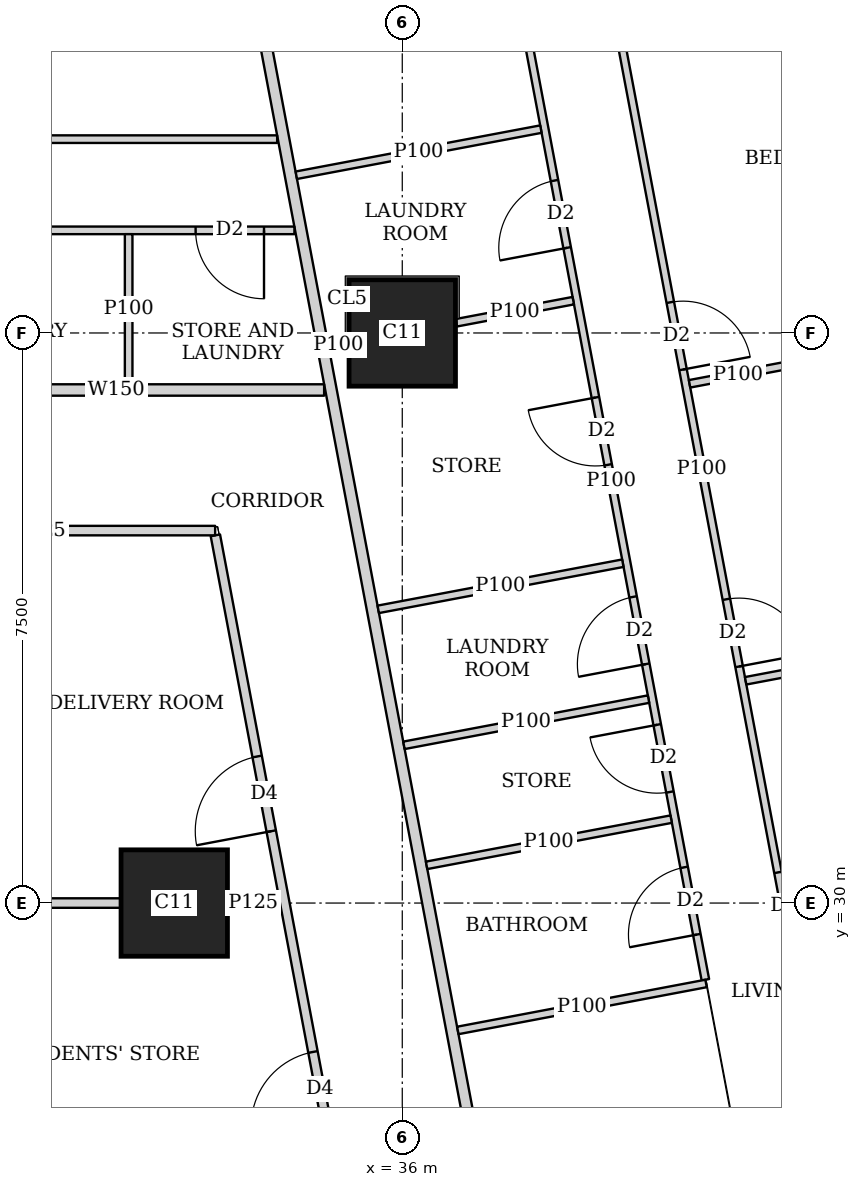
"""IFC4 building model, lengths in metres.
Left out: names, types, materials, properties, quantities, classifications, styles, units other than length and angle.
Written with IfcOpenShell. Run it as: python <this file> out.ifc"""

import sys

from ifc_helpers import new_model, si_unit, direction, frame, frame_2d, origin, origin_2d, place, context, subcontext, project, spatial, rectangle, extrude, element, fill, save


model = new_model("IFC4")
c1 = context("Model", 3, precision=1e-05, world=origin(), true_north=direction((0.0, 1.0)))
c2 = subcontext(c1, "Body", "Model", "MODEL_VIEW")
j1 = project(units=[si_unit("LENGTHUNIT", "METRE"), si_unit("PLANEANGLEUNIT", "RADIAN")], contexts=[c1])
p1 = place(None, origin())
s1 = spatial("IfcSite", under=j1, at=p1, CompositionType="ELEMENT")
p2 = place(p1, origin())
s2 = spatial("IfcBuilding", under=s1, at=p2, CompositionType="ELEMENT")
p3 = place(p2, frame((0.0, 0.0, 266.6)))
s3 = spatial("IfcBuildingStorey", under=s2, at=p3, CompositionType="ELEMENT", Elevation=266.6)
for number, where, z_axis, x_axis in (
    (1, (33.0, 30.0, 0.0), (0.0, 0.0, 1.0), (1.0, 0.0, 0.0)),
    (2, (36.0, 37.5, 0.0), (0.0, 0.0, 1.0), (1.0, 0.0, 0.0)),
):
    element("IfcColumn", number, at=place(p3, frame(where, z_axis=z_axis, x_axis=x_axis)), inside=s3, PredefinedType="COLUMN", context=c2, shape_type="SweptSolid", body=[
        extrude(rectangle(XDim=1.4, YDim=1.4, at=origin_2d()), origin(), (0.0, 0.0, 1.0), 3.75),
    ])
p4 = place(p3, frame((29.501, 36.75, 0.0), z_axis=(0.0, 0.0, 1.0), x_axis=(1.0, 0.0, 0.0)))
e3 = element("IfcWall", 3, at=p4, inside=s3, PredefinedType="SOLIDWALL", context=c2, shape_type="SweptSolid", body=[
    extrude(rectangle(XDim=5.471, YDim=0.15, at=frame_2d((2.735, 0.0))), origin(), (0.0, 0.0, 1.0), 3.5),
])
p5 = place(p3, frame((34.036, 42.186, 0.0), z_axis=(0.0, 0.0, 1.0), x_axis=(0.185593518645, -0.9826266055, 0.0)))
e4 = element("IfcWall", 4, at=p5, inside=s3, PredefinedType="SOLIDWALL", context=c2, shape_type="SweptSolid", body=[
    extrude(rectangle(XDim=35.961, YDim=0.15, at=frame_2d((17.98, 0.0))), origin(), (0.0, 0.0, 1.0), 2.5),
])
p6 = place(p5, frame((15.529, 0.0, 0.0)))
e5 = element("IfcOpeningElement", 5, at=p6, cuts=e4, PredefinedType="OPENING", context=c2, shape_type="SweptSolid", body=[
    extrude(rectangle(XDim=1.0, YDim=2.1, at=frame_2d((0.5, 1.05))), frame((0.0, 0.085, 0.0), z_axis=(0.0, -1.0, 0.0), x_axis=(1.0, 0.0, 0.0)), (0.0, 0.0, 1.0), 0.17),
])
p7 = place(p5, frame((19.345, 0.0, 0.0)))
e6 = element("IfcOpeningElement", 6, at=p7, cuts=e4, PredefinedType="OPENING", context=c2, shape_type="SweptSolid", body=[
    extrude(rectangle(XDim=1.0, YDim=2.1, at=frame_2d((0.5, 1.05))), frame((0.0, 0.085, 0.0), z_axis=(0.0, -1.0, 0.0), x_axis=(1.0, 0.0, 0.0)), (0.0, 0.0, 1.0), 0.17),
])
p8 = place(p5, frame((30.594, 0.0, 0.0)))
e7 = element("IfcOpeningElement", 7, at=p8, cuts=e4, PredefinedType="OPENING", context=c2, shape_type="SweptSolid", body=[
    extrude(rectangle(XDim=1.0, YDim=2.1, at=frame_2d((0.5, 1.05))), frame((0.0, 0.085, 0.0), z_axis=(0.0, -1.0, 0.0), x_axis=(1.0, 0.0, 0.0)), (0.0, 0.0, 1.0), 0.17),
])
p9 = place(p3, frame((38.744, 42.045, 0.0), z_axis=(0.0, 0.0, 1.0), x_axis=(0.185614085367, -0.982622720739, 0.0)))
e8 = element("IfcWall", 8, at=p9, inside=s3, PredefinedType="PARTITIONING", context=c2, shape_type="SweptSolid", body=[
    extrude(rectangle(XDim=12.898, YDim=0.1, at=frame_2d((6.449, 0.0))), origin(), (0.0, 0.0, 1.0), 2.5),
])
p10 = place(p9, frame((11.848, 0.0, 0.0)))
e9 = element("IfcOpeningElement", 9, at=p10, cuts=e8, PredefinedType="OPENING", context=c2, shape_type="SweptSolid", body=[
    extrude(rectangle(XDim=0.9, YDim=2.1, at=frame_2d((0.45, 1.05))), frame((0.0, 0.06, 0.0), z_axis=(0.0, -1.0, 0.0), x_axis=(1.0, 0.0, 0.0)), (0.0, 0.0, 1.0), 0.12),
])
p11 = place(p9, frame((8.191, 0.0, 0.0)))
e10 = element("IfcOpeningElement", 10, at=p11, cuts=e8, PredefinedType="OPENING", context=c2, shape_type="SweptSolid", body=[
    extrude(rectangle(XDim=0.9, YDim=2.1, at=frame_2d((0.45, 1.05))), frame((0.0, 0.06, 0.0), z_axis=(0.0, -1.0, 0.0), x_axis=(1.0, 0.0, 0.0)), (0.0, 0.0, 1.0), 0.12),
])
p12 = place(p9, frame((4.215, 0.0, 0.0)))
e11 = element("IfcOpeningElement", 11, at=p12, cuts=e8, PredefinedType="OPENING", context=c2, shape_type="SweptSolid", body=[
    extrude(rectangle(XDim=0.9, YDim=2.1, at=frame_2d((0.45, 1.05))), frame((0.0, 0.06, 0.0), z_axis=(0.0, -1.0, 0.0), x_axis=(1.0, 0.0, 0.0)), (0.0, 0.0, 1.0), 0.12),
])
p13 = place(p3, frame((37.511, 42.109, 0.0), z_axis=(0.0, 0.0, 1.0), x_axis=(0.185550464988, -0.982634736279, 0.0)))
e12 = element("IfcWall", 12, at=p13, inside=s3, PredefinedType="PARTITIONING", context=c2, shape_type="SweptSolid", body=[
    extrude(rectangle(XDim=13.35, YDim=0.1, at=frame_2d((6.675, 0.0))), origin(), (0.0, 0.0, 1.0), 2.5),
])
p14 = place(p13, frame((11.845, 0.0, 0.0)))
e13 = element("IfcOpeningElement", 13, at=p14, cuts=e12, PredefinedType="OPENING", context=c2, shape_type="SweptSolid", body=[
    extrude(rectangle(XDim=0.9, YDim=2.1, at=frame_2d((0.45, 1.05))), frame((0.0, 0.06, 0.0), z_axis=(0.0, -1.0, 0.0), x_axis=(1.0, 0.0, 0.0)), (0.0, 0.0, 1.0), 0.12),
])
p15 = place(p13, frame((8.224, 0.0, 0.0)))
e14 = element("IfcOpeningElement", 14, at=p15, cuts=e12, PredefinedType="OPENING", context=c2, shape_type="SweptSolid", body=[
    extrude(rectangle(XDim=0.9, YDim=2.1, at=frame_2d((0.45, 1.05))), frame((0.0, 0.06, 0.0), z_axis=(0.0, -1.0, 0.0), x_axis=(1.0, 0.0, 0.0)), (0.0, 0.0, 1.0), 0.12),
])
p16 = place(p13, frame((2.65, 0.0, 0.0)))
e15 = element("IfcOpeningElement", 15, at=p16, cuts=e12, PredefinedType="OPENING", context=c2, shape_type="SweptSolid", body=[
    extrude(rectangle(XDim=0.9, YDim=2.1, at=frame_2d((0.45, 1.05))), frame((0.0, 0.06, 0.0), z_axis=(0.0, -1.0, 0.0), x_axis=(1.0, 0.0, 0.0)), (0.0, 0.0, 1.0), 0.12),
])
p17 = place(p13, frame((9.936, 0.0, 0.0)))
e16 = element("IfcOpeningElement", 16, at=p17, cuts=e12, PredefinedType="OPENING", context=c2, shape_type="SweptSolid", body=[
    extrude(rectangle(XDim=0.9, YDim=2.1, at=frame_2d((0.45, 1.05))), frame((0.0, 0.06, 0.0), z_axis=(0.0, -1.0, 0.0), x_axis=(1.0, 0.0, 0.0)), (0.0, 0.0, 1.0), 0.12),
])
p18 = place(p13, frame((5.555, 0.0, 0.0)))
e17 = element("IfcOpeningElement", 17, at=p18, cuts=e12, PredefinedType="OPENING", context=c2, shape_type="SweptSolid", body=[
    extrude(rectangle(XDim=0.9, YDim=2.1, at=frame_2d((0.45, 1.05))), frame((0.0, 0.06, 0.0), z_axis=(0.0, -1.0, 0.0), x_axis=(1.0, 0.0, 0.0)), (0.0, 0.0, 1.0), 0.12),
])
p19 = place(p3, frame((41.054, 37.072, 0.0), z_axis=(0.0, 0.0, 1.0), x_axis=(-0.982576752117, -0.185857273733, 0.0)))
e18 = element("IfcWall", 18, at=p19, inside=s3, PredefinedType="PARTITIONING", context=c2, shape_type="SweptSolid", body=[
    extrude(rectangle(XDim=1.297, YDim=0.1, at=frame_2d((0.648, 0.0))), origin(), (0.0, 0.0, 1.0), 3.5),
])
p20 = place(p3, frame((44.693, 33.713, 0.0), z_axis=(0.0, 0.0, 1.0), x_axis=(-0.982615600536, -0.185651775062, 0.0)))
e19 = element("IfcWall", 19, at=p20, inside=s3, PredefinedType="PARTITIONING", context=c2, shape_type="SweptSolid", body=[
    extrude(rectangle(XDim=4.249, YDim=0.1, at=frame_2d((2.125, 0.0))), origin(), (0.0, 0.0, 1.0), 2.5),
])
p21 = place(p3, frame((37.824, 40.182, 0.0), z_axis=(0.0, 0.0, 1.0), x_axis=(-0.982674977865, -0.185337227447, 0.0)))
e20 = element("IfcWall", 20, at=p21, inside=s3, PredefinedType="PARTITIONING", context=c2, shape_type="SweptSolid", body=[
    extrude(rectangle(XDim=3.275, YDim=0.1, at=frame_2d((1.637, 0.0))), origin(), (0.0, 0.0, 1.0), 3.5),
])
p22 = place(p3, frame((38.25, 37.925, 0.0), z_axis=(0.0, 0.0, 1.0), x_axis=(-0.982610209589, -0.185680305934, 0.0)))
e21 = element("IfcWall", 21, at=p22, inside=s3, PredefinedType="PARTITIONING", context=c2, shape_type="SweptSolid", body=[
    extrude(rectangle(XDim=1.567, YDim=0.1, at=frame_2d((0.784, 0.0))), origin(), (0.0, 0.0, 1.0), 3.5),
])
p23 = place(p3, frame((35.29, 37.366, 0.0), z_axis=(0.0, 0.0, 1.0), x_axis=(-0.982395465615, -0.18681313963, 0.0)))
e22 = element("IfcWall", 22, at=p23, inside=s3, PredefinedType="PARTITIONING", context=c2, shape_type="SweptSolid", body=[
    extrude(rectangle(XDim=0.263, YDim=0.1, at=frame_2d((0.131, 0.0))), origin(), (0.0, 0.0, 1.0), 3.5),
])
p24 = place(p3, frame((39.24, 32.683, 0.0), z_axis=(0.0, 0.0, 1.0), x_axis=(-0.982607026909, -0.185697147715, 0.0)))
e23 = element("IfcWall", 23, at=p24, inside=s3, PredefinedType="PARTITIONING", context=c2, shape_type="SweptSolid", body=[
    extrude(rectangle(XDim=3.275, YDim=0.1, at=frame_2d((1.637, 0.0))), origin(), (0.0, 0.0, 1.0), 3.5),
])
p25 = place(p3, frame((39.997, 28.942, 0.0), z_axis=(0.0, 0.0, 1.0), x_axis=(-0.982569883123, -0.185893584556, 0.0)))
e24 = element("IfcWall", 24, at=p25, inside=s3, PredefinedType="PARTITIONING", context=c2, shape_type="SweptSolid", body=[
    extrude(rectangle(XDim=3.324, YDim=0.1, at=frame_2d((1.662, 0.0))), origin(), (0.0, 0.0, 1.0), 3.5),
])
p26 = place(p3, frame((39.538, 31.104, 0.0), z_axis=(0.0, 0.0, 1.0), x_axis=(-0.982620626894, -0.185625169636, 0.0)))
e25 = element("IfcWall", 25, at=p26, inside=s3, PredefinedType="PARTITIONING", context=c2, shape_type="SweptSolid", body=[
    extrude(rectangle(XDim=3.275, YDim=0.1, at=frame_2d((1.637, 0.0))), origin(), (0.0, 0.0, 1.0), 2.5),
])
p27 = place(p3, frame((38.902, 34.471, 0.0), z_axis=(0.0, 0.0, 1.0), x_axis=(-0.982674977865, -0.185337227447, 0.0)))
e26 = element("IfcWall", 26, at=p27, inside=s3, PredefinedType="PARTITIONING", context=c2, shape_type="SweptSolid", body=[
    extrude(rectangle(XDim=3.275, YDim=0.1, at=frame_2d((1.637, 0.0))), origin(), (0.0, 0.0, 1.0), 3.5),
])
p28 = place(p3, frame((21.6, 40.05, 0.0), z_axis=(0.0, 0.0, 1.0), x_axis=(1.0, 0.0, 0.0)))
e27 = element("IfcWall", 27, at=p28, inside=s3, PredefinedType="PARTITIONING", context=c2, shape_type="SweptSolid", body=[
    extrude(rectangle(XDim=12.754, YDim=0.1, at=frame_2d((6.377, 0.0))), origin(), (0.0, 0.0, 1.0), 3.5),
])
p29 = place(p28, frame((0.2, 0.0, 0.0)))
e28 = element("IfcOpeningElement", 28, at=p29, cuts=e27, PredefinedType="OPENING", context=c2, shape_type="SweptSolid", body=[
    extrude(rectangle(XDim=0.9, YDim=2.1, at=frame_2d((0.45, 1.05))), frame((0.0, 0.06, 0.0), z_axis=(0.0, -1.0, 0.0), x_axis=(1.0, 0.0, 0.0)), (0.0, 0.0, 1.0), 0.12),
])
p30 = place(p28, frame((3.8, 0.0, 0.0)))
e29 = element("IfcOpeningElement", 29, at=p30, cuts=e27, PredefinedType="OPENING", context=c2, shape_type="SweptSolid", body=[
    extrude(rectangle(XDim=0.9, YDim=2.1, at=frame_2d((0.45, 1.05))), frame((0.0, 0.06, 0.0), z_axis=(0.0, -1.0, 0.0), x_axis=(1.0, 0.0, 0.0)), (0.0, 0.0, 1.0), 0.12),
])
p31 = place(p28, frame((7.4, 0.0, 0.0)))
e30 = element("IfcOpeningElement", 30, at=p31, cuts=e27, PredefinedType="OPENING", context=c2, shape_type="SweptSolid", body=[
    extrude(rectangle(XDim=0.9, YDim=2.1, at=frame_2d((0.45, 1.05))), frame((0.0, 0.06, 0.0), z_axis=(0.0, -1.0, 0.0), x_axis=(1.0, 0.0, 0.0)), (0.0, 0.0, 1.0), 0.12),
])
p32 = place(p3, frame((21.6, 38.85, 0.0), z_axis=(0.0, 0.0, 1.0), x_axis=(1.0, 0.0, 0.0)))
e31 = element("IfcWall", 31, at=p32, inside=s3, PredefinedType="PARTITIONING", context=c2, shape_type="SweptSolid", body=[
    extrude(rectangle(XDim=12.981, YDim=0.1, at=frame_2d((6.49, 0.0))), origin(), (0.0, 0.0, 1.0), 3.5),
])
p33 = place(p32, frame((1.35, 0.0, 0.0)))
e32 = element("IfcOpeningElement", 32, at=p33, cuts=e31, PredefinedType="OPENING", context=c2, shape_type="SweptSolid", body=[
    extrude(rectangle(XDim=0.9, YDim=2.1, at=frame_2d((0.45, 1.05))), frame((0.0, 0.06, 0.0), z_axis=(0.0, -1.0, 0.0), x_axis=(1.0, 0.0, 0.0)), (0.0, 0.0, 1.0), 0.12),
])
p34 = place(p32, frame((5.55, 0.0, 0.0)))
e33 = element("IfcOpeningElement", 33, at=p34, cuts=e31, PredefinedType="OPENING", context=c2, shape_type="SweptSolid", body=[
    extrude(rectangle(XDim=0.9, YDim=2.1, at=frame_2d((0.45, 1.05))), frame((0.0, 0.06, 0.0), z_axis=(0.0, -1.0, 0.0), x_axis=(1.0, 0.0, 0.0)), (0.0, 0.0, 1.0), 0.12),
])
p35 = place(p32, frame((8.55, 0.0, 0.0)))
e34 = element("IfcOpeningElement", 34, at=p35, cuts=e31, PredefinedType="OPENING", context=c2, shape_type="SweptSolid", body=[
    extrude(rectangle(XDim=0.9, YDim=2.1, at=frame_2d((0.45, 1.05))), frame((0.0, 0.06, 0.0), z_axis=(0.0, -1.0, 0.0), x_axis=(1.0, 0.0, 0.0)), (0.0, 0.0, 1.0), 0.12),
])
p36 = place(p32, frame((11.681, 0.0, 0.0)))
e35 = element("IfcOpeningElement", 35, at=p36, cuts=e31, PredefinedType="OPENING", context=c2, shape_type="SweptSolid", body=[
    extrude(rectangle(XDim=0.9, YDim=2.1, at=frame_2d((0.45, 1.05))), frame((0.0, 0.06, 0.0), z_axis=(0.0, -1.0, 0.0), x_axis=(1.0, 0.0, 0.0)), (0.0, 0.0, 1.0), 0.12),
])
p37 = place(p3, frame((32.4, 36.825, 0.0), z_axis=(0.0, 0.0, 1.0), x_axis=(0.0, 1.0, 0.0)))
e36 = element("IfcWall", 36, at=p37, inside=s3, PredefinedType="PARTITIONING", context=c2, shape_type="SweptSolid", body=[
    extrude(rectangle(XDim=1.975, YDim=0.1, at=frame_2d((0.988, 0.0))), origin(), (0.0, 0.0, 1.0), 3.5),
])
p38 = place(p3, frame((28.95, 34.9, 0.0), z_axis=(0.0, 0.0, 1.0), x_axis=(1.0, 0.0, 0.0)))
e37 = element("IfcWall", 37, at=p38, inside=s3, PredefinedType="PARTITIONING", context=c2, shape_type="SweptSolid", body=[
    extrude(rectangle(XDim=4.588, YDim=0.125, at=frame_2d((2.294, 0.0))), origin(), (0.0, 0.0, 1.0), 3.5),
])
p39 = place(p3, frame((38.202, 10.163, 0.0), z_axis=(0.0, 0.0, 1.0), x_axis=(-0.185610321132, 0.982623431783, 0.0)))
e38 = element("IfcWall", 38, at=p39, inside=s3, PredefinedType="PARTITIONING", context=c2, shape_type="SweptSolid", body=[
    extrude(rectangle(XDim=25.111, YDim=0.125, at=frame_2d((12.556, 0.0))), origin(), (0.0, 0.0, 1.0), 2.5),
])
p40 = place(p39, frame((0.708, 0.0, 0.0)))
e39 = element("IfcOpeningElement", 39, at=p40, cuts=e38, PredefinedType="OPENING", context=c2, shape_type="SweptSolid", body=[
    extrude(rectangle(XDim=1.0, YDim=2.1, at=frame_2d((0.5, 1.05))), frame((0.0, 0.073, 0.0), z_axis=(0.0, -1.0, 0.0), x_axis=(1.0, 0.0, 0.0)), (0.0, 0.0, 1.0), 0.145),
])
p41 = place(p39, frame((5.9, 0.0, 0.0)))
e40 = element("IfcOpeningElement", 40, at=p41, cuts=e38, PredefinedType="OPENING", context=c2, shape_type="SweptSolid", body=[
    extrude(rectangle(XDim=1.0, YDim=2.1, at=frame_2d((0.5, 1.05))), frame((0.0, 0.073, 0.0), z_axis=(0.0, -1.0, 0.0), x_axis=(1.0, 0.0, 0.0)), (0.0, 0.0, 1.0), 0.145),
])
p42 = place(p39, frame((13.378, 0.0, 0.0)))
e41 = element("IfcOpeningElement", 41, at=p42, cuts=e38, PredefinedType="OPENING", context=c2, shape_type="SweptSolid", body=[
    extrude(rectangle(XDim=1.0, YDim=2.1, at=frame_2d((0.5, 1.05))), frame((0.0, 0.073, 0.0), z_axis=(0.0, -1.0, 0.0), x_axis=(1.0, 0.0, 0.0)), (0.0, 0.0, 1.0), 0.145),
])
p43 = place(p39, frame((17.194, 0.0, 0.0)))
e42 = element("IfcOpeningElement", 42, at=p43, cuts=e38, PredefinedType="OPENING", context=c2, shape_type="SweptSolid", body=[
    extrude(rectangle(XDim=1.0, YDim=2.1, at=frame_2d((0.5, 1.05))), frame((0.0, 0.073, 0.0), z_axis=(0.0, -1.0, 0.0), x_axis=(1.0, 0.0, 0.0)), (0.0, 0.0, 1.0), 0.145),
])
p44 = place(p39, frame((21.15, 0.0, 0.0)))
e43 = element("IfcOpeningElement", 43, at=p44, cuts=e38, PredefinedType="OPENING", context=c2, shape_type="SweptSolid", body=[
    extrude(rectangle(XDim=1.0, YDim=2.1, at=frame_2d((0.5, 1.05))), frame((0.0, 0.073, 0.0), z_axis=(0.0, -1.0, 0.0), x_axis=(1.0, 0.0, 0.0)), (0.0, 0.0, 1.0), 0.145),
])
p45 = place(p3, frame((29.25, 30.0, 0.0), z_axis=(0.0, 0.0, 1.0), x_axis=(1.0, 0.0, 0.0)))
e44 = element("IfcWall", 44, at=p45, inside=s3, PredefinedType="PARTITIONING", context=c2, shape_type="SweptSolid", body=[
    extrude(rectangle(XDim=3.049, YDim=0.125, at=frame_2d((1.524, 0.0))), origin(), (0.0, 0.0, 1.0), 3.5),
])
p46 = place(p3, frame((33.701, 30.0, 0.0), z_axis=(0.0, 0.0, 1.0), x_axis=(1.0, 0.0, 0.0)))
e45 = element("IfcWall", 45, at=p46, inside=s3, PredefinedType="PARTITIONING", context=c2, shape_type="SweptSolid", body=[
    extrude(rectangle(XDim=0.678, YDim=0.125, at=frame_2d((0.339, 0.0))), origin(), (0.0, 0.0, 1.0), 2.5),
])
p47 = place(p10, origin())
e46 = element("IfcDoor", 46, at=p47, inside=s3, OperationType="SINGLE_SWING_RIGHT", PredefinedType="DOOR", context=c2, shape_type="SweptSolid", body=[
    extrude(rectangle(XDim=0.9, YDim=2.1, at=frame_2d((0.45, 1.05))), frame((0.0, 0.025, 0.0), z_axis=(0.0, -1.0, 0.0), x_axis=(1.0, 0.0, 0.0)), (0.0, 0.0, 1.0), 0.05),
])
fill(e9, e46)
p48 = place(p11, origin())
e47 = element("IfcDoor", 47, at=p48, inside=s3, OperationType="SINGLE_SWING_RIGHT", PredefinedType="DOOR", context=c2, shape_type="SweptSolid", body=[
    extrude(rectangle(XDim=0.9, YDim=2.1, at=frame_2d((0.45, 1.05))), frame((0.0, 0.025, 0.0), z_axis=(0.0, -1.0, 0.0), x_axis=(1.0, 0.0, 0.0)), (0.0, 0.0, 1.0), 0.05),
])
fill(e10, e47)
p49 = place(p12, origin())
e48 = element("IfcDoor", 48, at=p49, inside=s3, OperationType="SINGLE_SWING_RIGHT", PredefinedType="DOOR", context=c2, shape_type="SweptSolid", body=[
    extrude(rectangle(XDim=0.9, YDim=2.1, at=frame_2d((0.45, 1.05))), frame((0.0, 0.025, 0.0), z_axis=(0.0, -1.0, 0.0), x_axis=(1.0, 0.0, 0.0)), (0.0, 0.0, 1.0), 0.05),
])
fill(e11, e48)
p50 = place(p14, origin())
e49 = element("IfcDoor", 49, at=p50, inside=s3, OperationType="SINGLE_SWING_LEFT", PredefinedType="DOOR", context=c2, shape_type="SweptSolid", body=[
    extrude(rectangle(XDim=0.9, YDim=2.1, at=frame_2d((0.45, 1.05))), frame((0.0, 0.025, 0.0), z_axis=(0.0, -1.0, 0.0), x_axis=(1.0, 0.0, 0.0)), (0.0, 0.0, 1.0), 0.05),
])
fill(e13, e49)
p51 = place(p15, origin())
e50 = element("IfcDoor", 50, at=p51, inside=s3, OperationType="SINGLE_SWING_LEFT", PredefinedType="DOOR", context=c2, shape_type="SweptSolid", body=[
    extrude(rectangle(XDim=0.9, YDim=2.1, at=frame_2d((0.45, 1.05))), frame((0.0, 0.025, 0.0), z_axis=(0.0, -1.0, 0.0), x_axis=(1.0, 0.0, 0.0)), (0.0, 0.0, 1.0), 0.05),
])
fill(e14, e50)
p52 = place(p16, origin())
e51 = element("IfcDoor", 51, at=p52, inside=s3, OperationType="SINGLE_SWING_LEFT", PredefinedType="DOOR", context=c2, shape_type="SweptSolid", body=[
    extrude(rectangle(XDim=0.9, YDim=2.1, at=frame_2d((0.45, 1.05))), frame((0.0, 0.025, 0.0), z_axis=(0.0, -1.0, 0.0), x_axis=(1.0, 0.0, 0.0)), (0.0, 0.0, 1.0), 0.05),
])
fill(e15, e51)
p53 = place(p17, origin())
e52 = element("IfcDoor", 52, at=p53, inside=s3, OperationType="SINGLE_SWING_RIGHT", PredefinedType="DOOR", context=c2, shape_type="SweptSolid", body=[
    extrude(rectangle(XDim=0.9, YDim=2.1, at=frame_2d((0.45, 1.05))), frame((0.0, 0.025, 0.0), z_axis=(0.0, -1.0, 0.0), x_axis=(1.0, 0.0, 0.0)), (0.0, 0.0, 1.0), 0.05),
])
fill(e16, e52)
p54 = place(p18, origin())
e53 = element("IfcDoor", 53, at=p54, inside=s3, OperationType="SINGLE_SWING_RIGHT", PredefinedType="DOOR", context=c2, shape_type="SweptSolid", body=[
    extrude(rectangle(XDim=0.9, YDim=2.1, at=frame_2d((0.45, 1.05))), frame((0.0, 0.025, 0.0), z_axis=(0.0, -1.0, 0.0), x_axis=(1.0, 0.0, 0.0)), (0.0, 0.0, 1.0), 0.05),
])
fill(e17, e53)
p55 = place(p36, origin())
e54 = element("IfcDoor", 54, at=p55, inside=s3, OperationType="SINGLE_SWING_LEFT", PredefinedType="DOOR", context=c2, shape_type="SweptSolid", body=[
    extrude(rectangle(XDim=0.9, YDim=2.1, at=frame_2d((0.45, 1.05))), frame((0.0, 0.025, 0.0), z_axis=(0.0, -1.0, 0.0), x_axis=(1.0, 0.0, 0.0)), (0.0, 0.0, 1.0), 0.05),
])
fill(e35, e54)
p56 = place(p43, origin())
e55 = element("IfcDoor", 55, at=p56, inside=s3, OperationType="SINGLE_SWING_LEFT", PredefinedType="DOOR", context=c2, shape_type="SweptSolid", body=[
    extrude(rectangle(XDim=1.0, YDim=2.1, at=frame_2d((0.5, 1.05))), frame((0.0, 0.025, 0.0), z_axis=(0.0, -1.0, 0.0), x_axis=(1.0, 0.0, 0.0)), (0.0, 0.0, 1.0), 0.05),
])
fill(e42, e55)
p57 = place(p44, origin())
e56 = element("IfcDoor", 56, at=p57, inside=s3, OperationType="SINGLE_SWING_LEFT", PredefinedType="DOOR", context=c2, shape_type="SweptSolid", body=[
    extrude(rectangle(XDim=1.0, YDim=2.1, at=frame_2d((0.5, 1.05))), frame((0.0, 0.025, 0.0), z_axis=(0.0, -1.0, 0.0), x_axis=(1.0, 0.0, 0.0)), (0.0, 0.0, 1.0), 0.05),
])
fill(e43, e56)
save(model, sys.argv[1])
